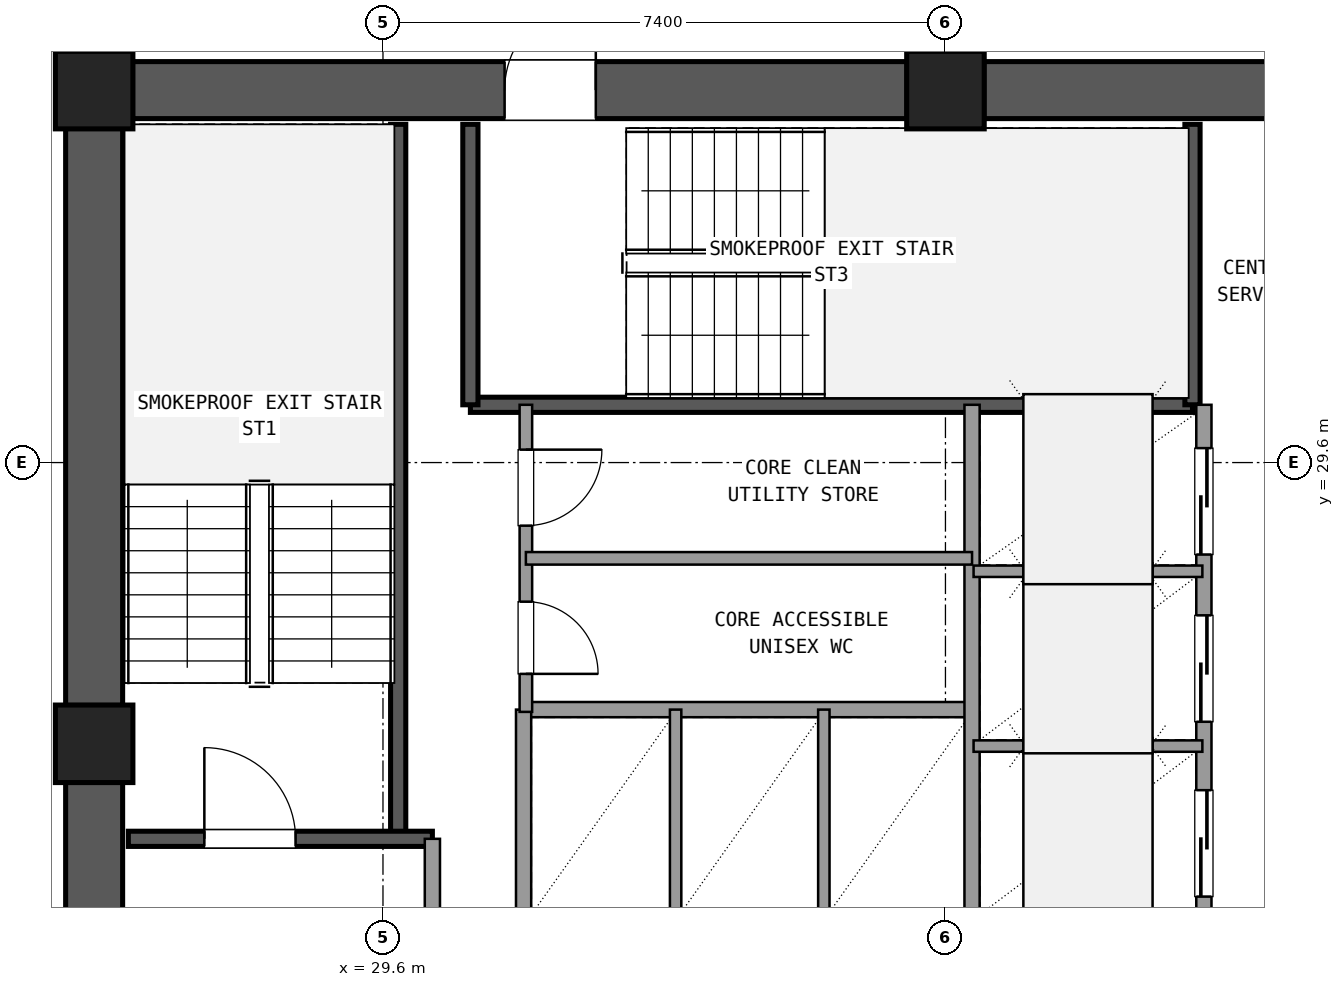
"""IFC4 building model, lengths in metres.
Left out: names, types, materials, properties, quantities, classifications, styles, units other than length and angle.
Written with IfcOpenShell. Run it as: python <this file> out.ifc"""

import sys

from ifc_helpers import new_model, si_unit, direction, frame, frame_2d, origin, origin_2d, place, context, subcontext, project, spatial, rectangle, extrude, element, fill, save


model = new_model("IFC4")
c1 = context("Model", 3, precision=1e-05, world=origin(), true_north=direction((0.0, 1.0)))
c2 = subcontext(c1, "Body", "Model", "MODEL_VIEW")
j1 = project(units=[si_unit("LENGTHUNIT", "METRE"), si_unit("PLANEANGLEUNIT", "RADIAN")], contexts=[c1])
p1 = place(None, origin())
s1 = spatial("IfcSite", under=j1, at=p1, CompositionType="ELEMENT")
p2 = place(p1, origin())
s2 = spatial("IfcBuilding", under=s1, at=p2, CompositionType="ELEMENT")
p3 = place(p2, frame((0.0, 0.0, 134.82)))
s3 = spatial("IfcBuildingStorey", under=s2, at=p3, CompositionType="ELEMENT", Elevation=134.82)
for number, where, z_axis, x_axis in (
    (1, (37.0, 34.5, 0.0), (0.0, 0.0, 1.0), (1.0, 0.0, 0.0)),
    (2, (25.8, 34.5, 0.0), (0.0, 0.0, 1.0), (1.0, 0.0, 0.0)),
    (3, (25.8, 25.9, 0.0), (0.0, 0.0, 1.0), (1.0, 0.0, 0.0)),
):
    element("IfcColumn", number, at=place(p3, frame(where, z_axis=z_axis, x_axis=x_axis)), inside=s3, PredefinedType="COLUMN", context=c2, shape_type="SweptSolid", body=[
        extrude(rectangle(XDim=1.02, YDim=1.02, at=origin_2d()), origin(), (0.0, 0.0, 1.0), 3.6),
    ])
p4 = place(p3, frame((47.695, 34.5, 0.0), z_axis=(0.0, 0.0, 1.0), x_axis=(-1.0, 0.0, 0.0)))
e4 = element("IfcWall", 4, at=p4, inside=s3, PredefinedType="SHEAR", context=c2, shape_type="SweptSolid", body=[
    extrude(rectangle(XDim=10.19, YDim=0.75, at=frame_2d((5.095, 0.0))), origin(), (0.0, 0.0, 1.0), 3.32),
])
p5 = place(p4, frame((4.595, 0.0, 0.0)))
e5 = element("IfcOpeningElement", 5, at=p5, cuts=e4, PredefinedType="OPENING", context=c2, shape_type="SweptSolid", body=[
    extrude(rectangle(XDim=1.6, YDim=2.2, at=frame_2d((0.8, 1.1))), frame((0.0, 0.385, 0.0), z_axis=(0.0, -1.0, 0.0), x_axis=(1.0, 0.0, 0.0)), (0.0, 0.0, 1.0), 0.77),
])
p6 = place(p3, frame((36.495, 34.5, 0.0), z_axis=(0.0, 0.0, 1.0), x_axis=(-1.0, 0.0, 0.0)))
e6 = element("IfcWall", 6, at=p6, inside=s3, PredefinedType="SHEAR", context=c2, shape_type="SweptSolid", body=[
    extrude(rectangle(XDim=10.19, YDim=0.75, at=frame_2d((5.095, 0.0))), origin(), (0.0, 0.0, 1.0), 3.32),
])
p7 = place(p6, frame((4.095, 0.0, 0.0)))
e7 = element("IfcOpeningElement", 7, at=p7, cuts=e6, PredefinedType="OPENING", context=c2, shape_type="SweptSolid", body=[
    extrude(rectangle(XDim=1.2, YDim=2.15, at=frame_2d((0.6, 1.075))), frame((0.0, 0.385, 0.0), z_axis=(0.0, -1.0, 0.0), x_axis=(1.0, 0.0, 0.0)), (0.0, 0.0, 1.0), 0.77),
])
p8 = place(p3, frame((25.8, 33.995, 0.0), z_axis=(0.0, 0.0, 1.0), x_axis=(0.0, -1.0, 0.0)))
e8 = element("IfcWall", 8, at=p8, inside=s3, PredefinedType="SHEAR", context=c2, shape_type="SweptSolid", body=[
    extrude(rectangle(XDim=7.59, YDim=0.75, at=frame_2d((3.795, 0.0))), origin(), (0.0, 0.0, 1.0), 3.32),
])
p9 = place(p3, frame((25.8, 25.395, 0.0), z_axis=(0.0, 0.0, 1.0), x_axis=(0.0, -1.0, 0.0)))
e9 = element("IfcWall", 9, at=p9, inside=s3, PredefinedType="SHEAR", context=c2, shape_type="SweptSolid", body=[
    extrude(rectangle(XDim=7.59, YDim=0.75, at=frame_2d((3.795, 0.0))), origin(), (0.0, 0.0, 1.0), 3.32),
])
p10 = place(p9, frame((2.145, 0.0, 0.0)))
e10 = element("IfcOpeningElement", 10, at=p10, cuts=e9, PredefinedType="OPENING", context=c2, shape_type="SweptSolid", body=[
    extrude(rectangle(XDim=1.2, YDim=2.15, at=frame_2d((0.6, 1.075))), frame((0.0, 0.385, 0.0), z_axis=(0.0, -1.0, 0.0), x_axis=(1.0, 0.0, 0.0)), (0.0, 0.0, 1.0), 0.77),
])
p11 = place(p3, frame((29.8, 24.65, 0.0), z_axis=(0.0, 0.0, 1.0), x_axis=(0.0, 1.0, 0.0)))
e11 = element("IfcWall", 11, at=p11, inside=s3, PredefinedType="SHEAR", context=c2, shape_type="SweptSolid", body=[
    extrude(rectangle(XDim=9.4, YDim=0.2, at=frame_2d((4.7, 0.0))), origin(), (0.0, 0.0, 1.0), 3.32),
])
p12 = place(p3, frame((26.25, 24.65, 0.0), z_axis=(0.0, 0.0, 1.0), x_axis=(1.0, 0.0, 0.0)))
e12 = element("IfcWall", 12, at=p12, inside=s3, PredefinedType="SHEAR", context=c2, shape_type="SweptSolid", body=[
    extrude(rectangle(XDim=4.0, YDim=0.2, at=frame_2d((2.0, 0.0))), origin(), (0.0, 0.0, 1.0), 3.32),
])
p13 = place(p12, frame((1.0, 0.0, 0.0)))
e13 = element("IfcOpeningElement", 13, at=p13, cuts=e12, PredefinedType="OPENING", context=c2, shape_type="SweptSolid", body=[
    extrude(rectangle(XDim=1.2, YDim=2.15, at=frame_2d((0.6, 1.075))), frame((0.0, 0.11, 0.0), z_axis=(0.0, -1.0, 0.0), x_axis=(1.0, 0.0, 0.0)), (0.0, 0.0, 1.0), 0.22),
])
p14 = place(p3, frame((30.75, 30.36, 0.0), z_axis=(0.0, 0.0, 1.0), x_axis=(1.0, 0.0, 0.0)))
e14 = element("IfcWall", 14, at=p14, inside=s3, PredefinedType="SHEAR", context=c2, shape_type="SweptSolid", body=[
    extrude(rectangle(XDim=9.5, YDim=0.2, at=frame_2d((4.75, 0.0))), origin(), (0.0, 0.0, 1.0), 3.32),
])
for number, where, z_axis, x_axis in (
    (15, (30.75, 30.36, 0.0), (0.0, 0.0, 1.0), (0.0, 1.0, 0.0)),
    (16, (40.25, 30.36, 0.0), (0.0, 0.0, 1.0), (0.0, 1.0, 0.0)),
):
    element("IfcWall", number, at=place(p3, frame(where, z_axis=z_axis, x_axis=x_axis)), inside=s3, PredefinedType="SHEAR", context=c2, shape_type="SweptSolid", body=[
        extrude(rectangle(XDim=3.69, YDim=0.2, at=frame_2d((1.845, 0.0))), origin(), (0.0, 0.0, 1.0), 3.32),
    ])
p15 = place(p3, frame((30.25, 17.75, 0.0), z_axis=(0.0, 0.0, 1.0), x_axis=(0.0, 1.0, 0.0)))
e17 = element("IfcWall", 17, at=p15, inside=s3, PredefinedType="SOLIDWALL", context=c2, shape_type="SweptSolid", body=[
    extrude(rectangle(XDim=6.9, YDim=0.2, at=frame_2d((3.45, 0.0))), origin(), (0.0, 0.0, 1.0), 2.61),
])
p16 = place(p15, frame((4.15, 0.0, 0.0)))
e18 = element("IfcOpeningElement", 18, at=p16, cuts=e17, PredefinedType="OPENING", context=c2, shape_type="SweptSolid", body=[
    extrude(rectangle(XDim=1.2, YDim=2.15, at=frame_2d((0.6, 1.075))), frame((0.0, 0.11, 0.0), z_axis=(0.0, -1.0, 0.0), x_axis=(1.0, 0.0, 0.0)), (0.0, 0.0, 1.0), 0.22),
])
p17 = place(p3, frame((31.45, 26.35, 0.0), z_axis=(0.0, 0.0, 1.0), x_axis=(1.0, 0.0, 0.0)))
e19 = element("IfcWall", 19, at=p17, inside=s3, PredefinedType="SOLIDWALL", context=c2, shape_type="SweptSolid", body=[
    extrude(rectangle(XDim=5.9, YDim=0.2, at=frame_2d((2.95, 0.0))), origin(), (0.0, 0.0, 1.0), 2.61),
])
p18 = place(p3, frame((31.45, 23.54, 0.0), z_axis=(0.0, 0.0, 1.0), x_axis=(0.0, 1.0, 0.0)))
e20 = element("IfcWall", 20, at=p18, inside=s3, PredefinedType="SOLIDWALL", context=c2, shape_type="SweptSolid", body=[
    extrude(rectangle(XDim=2.81, YDim=0.2, at=frame_2d((1.405, 0.0))), origin(), (0.0, 0.0, 1.0), 2.61),
])
for number, where, z_axis, x_axis in (
    (21, (33.45, 23.54, 0.0), (0.0, 0.0, 1.0), (0.0, 1.0, 0.0)),
    (22, (35.4, 23.54, 0.0), (0.0, 0.0, 1.0), (0.0, 1.0, 0.0)),
):
    element("IfcWall", number, at=place(p3, frame(where, z_axis=z_axis, x_axis=x_axis)), inside=s3, PredefinedType="PARTITIONING", context=c2, shape_type="SweptSolid", body=[
        extrude(rectangle(XDim=2.81, YDim=0.15, at=frame_2d((1.405, 0.0))), origin(), (0.0, 0.0, 1.0), 2.61),
    ])
p19 = place(p3, frame((37.35, 23.54, 0.0), z_axis=(0.0, 0.0, 1.0), x_axis=(0.0, 1.0, 0.0)))
e23 = element("IfcWall", 23, at=p19, inside=s3, PredefinedType="SOLIDWALL", context=c2, shape_type="SweptSolid", body=[
    extrude(rectangle(XDim=6.82, YDim=0.2, at=frame_2d((3.41, 0.0))), origin(), (0.0, 0.0, 1.0), 2.61),
])
p20 = place(p3, frame((40.4, 23.54, 0.0), z_axis=(0.0, 0.0, 1.0), x_axis=(0.0, 1.0, 0.0)))
e24 = element("IfcWall", 24, at=p20, inside=s3, PredefinedType="SOLIDWALL", context=c2, shape_type="SweptSolid", body=[
    extrude(rectangle(XDim=6.82, YDim=0.2, at=frame_2d((3.41, 0.0))), origin(), (0.0, 0.0, 1.0), 2.61),
])
p21 = place(p20, frame((0.35, 0.0, 0.0)))
e25 = element("IfcOpeningElement", 25, at=p21, cuts=e24, PredefinedType="OPENING", context=c2, shape_type="SweptSolid", body=[
    extrude(rectangle(XDim=1.4, YDim=2.2, at=frame_2d((0.7, 1.1))), frame((0.0, 0.11, 0.0), z_axis=(0.0, -1.0, 0.0), x_axis=(1.0, 0.0, 0.0)), (0.0, 0.0, 1.0), 0.22),
])
p22 = place(p20, frame((2.65, 0.0, 0.0)))
e26 = element("IfcOpeningElement", 26, at=p22, cuts=e24, PredefinedType="OPENING", context=c2, shape_type="SweptSolid", body=[
    extrude(rectangle(XDim=1.4, YDim=2.2, at=frame_2d((0.7, 1.1))), frame((0.0, 0.11, 0.0), z_axis=(0.0, -1.0, 0.0), x_axis=(1.0, 0.0, 0.0)), (0.0, 0.0, 1.0), 0.22),
])
p23 = place(p20, frame((4.85, 0.0, 0.0)))
e27 = element("IfcOpeningElement", 27, at=p23, cuts=e24, PredefinedType="OPENING", context=c2, shape_type="SweptSolid", body=[
    extrude(rectangle(XDim=1.4, YDim=2.2, at=frame_2d((0.7, 1.1))), frame((0.0, 0.11, 0.0), z_axis=(0.0, -1.0, 0.0), x_axis=(1.0, 0.0, 0.0)), (0.0, 0.0, 1.0), 0.22),
])
for number, where, z_axis, x_axis in (
    (28, (37.37, 25.87, 0.0), (0.0, 0.0, 1.0), (1.0, 0.0, 0.0)),
    (29, (37.37, 28.17, 0.0), (0.0, 0.0, 1.0), (1.0, 0.0, 0.0)),
):
    element("IfcWall", number, at=place(p3, frame(where, z_axis=z_axis, x_axis=x_axis)), inside=s3, PredefinedType="PARTITIONING", context=c2, shape_type="SweptSolid", body=[
        extrude(rectangle(XDim=3.01, YDim=0.15, at=frame_2d((1.505, 0.0))), origin(), (0.0, 0.0, 1.0), 2.61),
    ])
p24 = place(p3, frame((31.48, 26.32, 0.0), z_axis=(0.0, 0.0, 1.0), x_axis=(0.0, 1.0, 0.0)))
e30 = element("IfcWall", 30, at=p24, inside=s3, PredefinedType="PLUMBINGWALL", context=c2, shape_type="SweptSolid", body=[
    extrude(rectangle(XDim=4.04, YDim=0.165, at=frame_2d((2.02, 0.0))), origin(), (0.0, 0.0, 1.0), 2.61),
])
p25 = place(p24, frame((0.5, 0.0, 0.0)))
e31 = element("IfcOpeningElement", 31, at=p25, cuts=e30, PredefinedType="OPENING", context=c2, shape_type="SweptSolid", body=[
    extrude(rectangle(XDim=0.95, YDim=2.1, at=frame_2d((0.475, 1.05))), frame((0.0, 0.093, 0.0), z_axis=(0.0, -1.0, 0.0), x_axis=(1.0, 0.0, 0.0)), (0.0, 0.0, 1.0), 0.185),
])
p26 = place(p24, frame((2.45, 0.0, 0.0)))
e32 = element("IfcOpeningElement", 32, at=p26, cuts=e30, PredefinedType="OPENING", context=c2, shape_type="SweptSolid", body=[
    extrude(rectangle(XDim=1.0, YDim=2.15, at=frame_2d((0.5, 1.075))), frame((0.0, 0.093, 0.0), z_axis=(0.0, -1.0, 0.0), x_axis=(1.0, 0.0, 0.0)), (0.0, 0.0, 1.0), 0.185),
])
p27 = place(p3, frame((31.48, 28.34, 0.0), z_axis=(0.0, 0.0, 1.0), x_axis=(1.0, 0.0, 0.0)))
e33 = element("IfcWall", 33, at=p27, inside=s3, PredefinedType="PLUMBINGWALL", context=c2, shape_type="SweptSolid", body=[
    extrude(rectangle(XDim=5.87, YDim=0.165, at=frame_2d((2.935, 0.0))), origin(), (0.0, 0.0, 1.0), 2.61),
])
p28 = place(p3, frame((37.0, 34.95, 0.0), z_axis=(0.0, 0.0, 1.0), x_axis=(0.0, 1.0, 0.0)))
e34 = element("IfcWall", 34, at=p28, inside=s3, PredefinedType="PARTITIONING", context=c2, shape_type="SweptSolid", body=[
    extrude(rectangle(XDim=3.21, YDim=0.18, at=frame_2d((1.605, 0.0))), origin(), (0.0, 0.0, 1.0), 2.61),
])
p29 = place(p28, frame((0.605, 0.0, 0.0)))
e35 = element("IfcOpeningElement", 35, at=p29, cuts=e34, PredefinedType="OPENING", context=c2, shape_type="SweptSolid", body=[
    extrude(rectangle(XDim=2.0, YDim=2.2, at=frame_2d((1.0, 1.1))), frame((0.0, 0.1, 0.0), z_axis=(0.0, -1.0, 0.0), x_axis=(1.0, 0.0, 0.0)), (0.0, 0.0, 1.0), 0.2),
])
p30 = place(p13, origin())
e36 = element("IfcDoor", 36, at=p30, inside=s3, OperationType="SINGLE_SWING_LEFT", PredefinedType="DOOR", context=c2, shape_type="SweptSolid", body=[
    extrude(rectangle(XDim=1.2, YDim=2.15, at=frame_2d((0.6, 1.075))), frame((0.0, 0.025, 0.0), z_axis=(0.0, -1.0, 0.0), x_axis=(1.0, 0.0, 0.0)), (0.0, 0.0, 1.0), 0.05),
])
fill(e13, e36)
p31 = place(p7, frame((1.2, 0.0, 0.0), z_axis=(0.0, 0.0, 1.0), x_axis=(-1.0, 0.0, 0.0)))
e37 = element("IfcDoor", 37, at=p31, inside=s3, OperationType="SINGLE_SWING_LEFT", PredefinedType="DOOR", context=c2, shape_type="SweptSolid", body=[
    extrude(rectangle(XDim=1.2, YDim=2.15, at=frame_2d((0.6, 1.075))), frame((0.0, 0.025, 0.0), z_axis=(0.0, -1.0, 0.0), x_axis=(1.0, 0.0, 0.0)), (0.0, 0.0, 1.0), 0.05),
])
fill(e7, e37)
p32 = place(p21, origin())
e38 = element("IfcDoor", 38, at=p32, inside=s3, OperationType="SLIDING_TO_LEFT", PredefinedType="DOOR", context=c2, shape_type="SweptSolid", body=[
    extrude(rectangle(XDim=1.4, YDim=2.2, at=frame_2d((0.7, 1.1))), frame((0.0, 0.025, 0.0), z_axis=(0.0, -1.0, 0.0), x_axis=(1.0, 0.0, 0.0)), (0.0, 0.0, 1.0), 0.05),
])
fill(e25, e38)
p33 = place(p22, origin())
e39 = element("IfcDoor", 39, at=p33, inside=s3, OperationType="SLIDING_TO_LEFT", PredefinedType="DOOR", context=c2, shape_type="SweptSolid", body=[
    extrude(rectangle(XDim=1.4, YDim=2.2, at=frame_2d((0.7, 1.1))), frame((0.0, 0.025, 0.0), z_axis=(0.0, -1.0, 0.0), x_axis=(1.0, 0.0, 0.0)), (0.0, 0.0, 1.0), 0.05),
])
fill(e26, e39)
p34 = place(p23, origin())
e40 = element("IfcDoor", 40, at=p34, inside=s3, OperationType="SLIDING_TO_RIGHT", PredefinedType="DOOR", context=c2, shape_type="SweptSolid", body=[
    extrude(rectangle(XDim=1.4, YDim=2.2, at=frame_2d((0.7, 1.1))), frame((0.0, 0.025, 0.0), z_axis=(0.0, -1.0, 0.0), x_axis=(1.0, 0.0, 0.0)), (0.0, 0.0, 1.0), 0.05),
])
fill(e27, e40)
p35 = place(p25, frame((0.95, 0.0, 0.0), z_axis=(0.0, 0.0, 1.0), x_axis=(-1.0, 0.0, 0.0)))
e41 = element("IfcDoor", 41, at=p35, inside=s3, OperationType="SINGLE_SWING_LEFT", PredefinedType="DOOR", context=c2, shape_type="SweptSolid", body=[
    extrude(rectangle(XDim=0.95, YDim=2.1, at=frame_2d((0.475, 1.05))), frame((0.0, 0.025, 0.0), z_axis=(0.0, -1.0, 0.0), x_axis=(1.0, 0.0, 0.0)), (0.0, 0.0, 1.0), 0.05),
])
fill(e31, e41)
p36 = place(p26, frame((1.0, 0.0, 0.0), z_axis=(0.0, 0.0, 1.0), x_axis=(-1.0, 0.0, 0.0)))
e42 = element("IfcDoor", 42, at=p36, inside=s3, OperationType="SINGLE_SWING_RIGHT", PredefinedType="DOOR", context=c2, shape_type="SweptSolid", body=[
    extrude(rectangle(XDim=1.0, YDim=2.15, at=frame_2d((0.5, 1.075))), frame((0.0, 0.025, 0.0), z_axis=(0.0, -1.0, 0.0), x_axis=(1.0, 0.0, 0.0)), (0.0, 0.0, 1.0), 0.05),
])
fill(e32, e42)
save(model, sys.argv[1])
